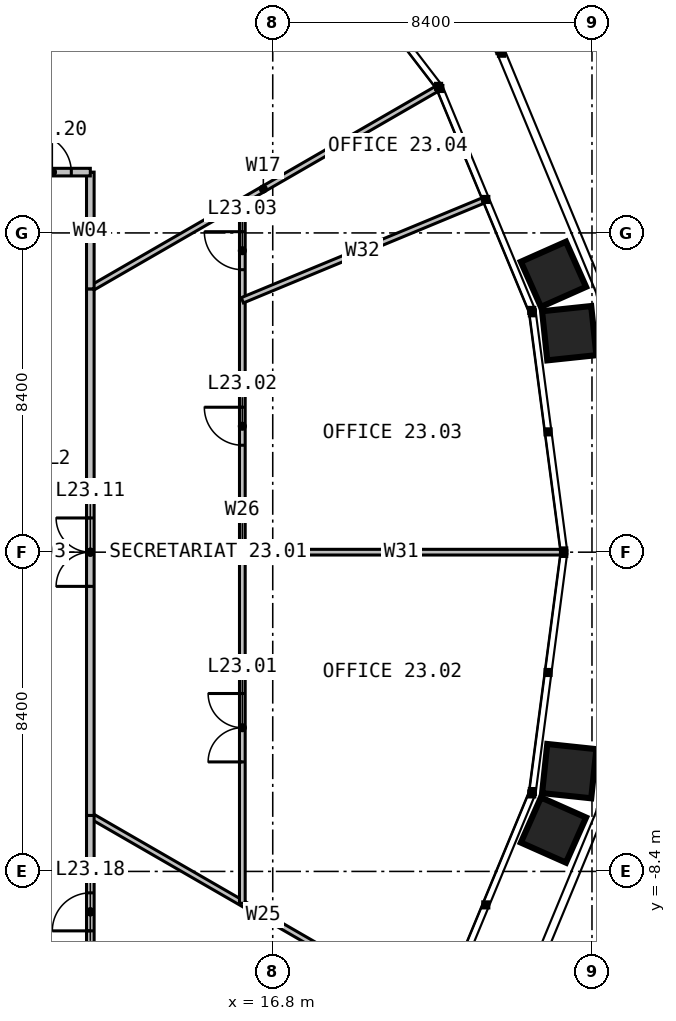
"""IFC4 building model, lengths in metres.
Left out: names, types, materials, properties, quantities, classifications, styles, units other than length and angle.
Written with IfcOpenShell. Run it as: python <this file> out.ifc"""

import sys

from ifc_helpers import new_model, si_unit, direction, frame, frame_2d, origin, place, context, subcontext, project, spatial, rectangle, extrude, element, fill, save


model = new_model("IFC4")
c1 = context("Model", 3, precision=1e-05, world=origin(), true_north=direction((0.0, 1.0)))
c2 = subcontext(c1, "Body", "Model", "MODEL_VIEW")
j1 = project(units=[si_unit("LENGTHUNIT", "METRE"), si_unit("PLANEANGLEUNIT", "RADIAN")], contexts=[c1])
p1 = place(None, origin())
s1 = spatial("IfcSite", under=j1, at=p1, CompositionType="ELEMENT")
p2 = place(p1, origin())
s2 = spatial("IfcBuilding", under=s1, at=p2, CompositionType="ELEMENT")
p3 = place(p2, frame((0.0, 0.0, 98.0)))
s3 = spatial("IfcBuildingStorey", under=s2, at=p3, CompositionType="ELEMENT", Elevation=98.0)
for number, where, z_axis, x_axis in (
    (1, (12.0, -6.928, 0.0), (0.0, 0.0, 1.0), (0.866, -0.5, 0.0)),
    (2, (12.0, 6.928, 0.0), (0.0, 0.0, 1.0), (0.866, 0.5, 0.0)),
):
    element("IfcWall", number, at=place(p3, frame(where, z_axis=z_axis, x_axis=x_axis)), inside=s3, PredefinedType="PARTITIONING", context=c2, shape_type="SweptSolid", body=[
        extrude(rectangle(XDim=10.514, YDim=0.15, at=frame_2d((5.257, 0.0))), origin(), (0.0, 0.0, 1.0), 2.79),
    ])
p4 = place(p3, frame((16.0, -9.238, 0.0), z_axis=(0.0, 0.0, 1.0), x_axis=(0.0, 1.0, 0.0)))
e3 = element("IfcWall", 3, at=p4, inside=s3, PredefinedType="PARTITIONING", context=c2, shape_type="SweptSolid", body=[
    extrude(rectangle(XDim=18.475, YDim=0.15, at=frame_2d((9.238, 0.0))), origin(), (0.0, 0.0, 1.0), 2.79),
])
p5 = place(p4, frame((3.719, 0.0, 0.0)))
e4 = element("IfcOpeningElement", 4, at=p5, cuts=e3, PredefinedType="OPENING", context=c2, shape_type="SweptSolid", body=[
    extrude(rectangle(XDim=1.8, YDim=2.2, at=frame_2d((0.9, 1.1))), frame((0.0, 0.085, 0.0), z_axis=(0.0, -1.0, 0.0), x_axis=(1.0, 0.0, 0.0)), (0.0, 0.0, 1.0), 0.17),
])
p6 = place(p4, frame((12.051, 0.0, 0.0)))
e5 = element("IfcOpeningElement", 5, at=p6, cuts=e3, PredefinedType="OPENING", context=c2, shape_type="SweptSolid", body=[
    extrude(rectangle(XDim=1.0, YDim=2.2, at=frame_2d((0.5, 1.1))), frame((0.0, 0.085, 0.0), z_axis=(0.0, -1.0, 0.0), x_axis=(1.0, 0.0, 0.0)), (0.0, 0.0, 1.0), 0.17),
])
p7 = place(p4, frame((16.67, 0.0, 0.0)))
e6 = element("IfcOpeningElement", 6, at=p7, cuts=e3, PredefinedType="OPENING", context=c2, shape_type="SweptSolid", body=[
    extrude(rectangle(XDim=1.0, YDim=2.2, at=frame_2d((0.5, 1.1))), frame((0.0, 0.085, 0.0), z_axis=(0.0, -1.0, 0.0), x_axis=(1.0, 0.0, 0.0)), (0.0, 0.0, 1.0), 0.17),
])
p8 = place(p3, frame((16.0, 0.0, 0.0), z_axis=(0.0, 0.0, 1.0), x_axis=(1.0, 0.0, 0.0)))
e7 = element("IfcWall", 7, at=p8, inside=s3, PredefinedType="PARTITIONING", context=c2, shape_type="SweptSolid", body=[
    extrude(rectangle(XDim=8.37, YDim=0.15, at=frame_2d((4.185, 0.0))), origin(), (0.0, 0.0, 1.0), 2.79),
])
p9 = place(p3, frame((16.0, 6.627, 0.0), z_axis=(0.0, 0.0, 1.0), x_axis=(0.923878127723, 0.382686823805, 0.0)))
e8 = element("IfcWall", 8, at=p9, inside=s3, PredefinedType="PARTITIONING", context=c2, shape_type="SweptSolid", body=[
    extrude(rectangle(XDim=6.844, YDim=0.15, at=frame_2d((3.422, 0.0))), origin(), (0.0, 0.0, 1.0), 2.79),
])
p10 = place(p3, frame((12.0, -6.928, 0.0), z_axis=(0.0, 0.0, 1.0), x_axis=(0.0, 1.0, 0.0)))
e9 = element("IfcWall", 9, at=p10, inside=s3, PredefinedType="PARTITIONING", context=c2, shape_type="SweptSolid", body=[
    extrude(rectangle(XDim=13.856, YDim=0.2, at=frame_2d((6.928, 0.0))), origin(), (0.0, 0.0, 1.0), 3.8),
])
p11 = place(p10, frame((6.028, 0.0, 0.0)))
e10 = element("IfcOpeningElement", 10, at=p11, cuts=e9, PredefinedType="OPENING", context=c2, shape_type="SweptSolid", body=[
    extrude(rectangle(XDim=1.8, YDim=2.2, at=frame_2d((0.9, 1.1))), frame((0.0, 0.11, 0.0), z_axis=(0.0, -1.0, 0.0), x_axis=(1.0, 0.0, 0.0)), (0.0, 0.0, 1.0), 0.22),
])
p12 = place(p3, frame((12.0, 6.928, 0.0), z_axis=(0.0, 0.0, 1.0), x_axis=(0.0, 1.0, 0.0)))
e11 = element("IfcWall", 11, at=p12, inside=s3, PredefinedType="PARTITIONING", context=c2, shape_type="SweptSolid", body=[
    extrude(rectangle(XDim=3.072, YDim=0.2, at=frame_2d((1.536, 0.0))), origin(), (0.0, 0.0, 1.0), 3.8),
])
p13 = place(p3, frame((12.0, -12.0, 0.0), z_axis=(0.0, 0.0, 1.0), x_axis=(0.0, 1.0, 0.0)))
e12 = element("IfcWall", 12, at=p13, inside=s3, PredefinedType="PARTITIONING", context=c2, shape_type="SweptSolid", body=[
    extrude(rectangle(XDim=5.072, YDim=0.2, at=frame_2d((2.536, 0.0))), origin(), (0.0, 0.0, 1.0), 3.8),
])
p14 = place(p13, frame((2.036, 0.0, 0.0)))
e13 = element("IfcOpeningElement", 13, at=p14, cuts=e12, PredefinedType="OPENING", context=c2, shape_type="SweptSolid", body=[
    extrude(rectangle(XDim=1.0, YDim=2.2, at=frame_2d((0.5, 1.1))), frame((0.0, 0.11, 0.0), z_axis=(0.0, -1.0, 0.0), x_axis=(1.0, 0.0, 0.0)), (0.0, 0.0, 1.0), 0.22),
])
p15 = place(p3, frame((10.0, 10.0, 0.0), z_axis=(0.0, 0.0, 1.0), x_axis=(1.0, 0.0, 0.0)))
e14 = element("IfcWall", 14, at=p15, inside=s3, PredefinedType="PARTITIONING", context=c2, shape_type="SweptSolid", body=[
    extrude(rectangle(XDim=2.0, YDim=0.2, at=frame_2d((1.0, 0.0))), origin(), (0.0, 0.0, 1.0), 3.8),
])
p16 = place(p15, frame((0.5, 0.0, 0.0)))
e15 = element("IfcOpeningElement", 15, at=p16, cuts=e14, PredefinedType="OPENING", context=c2, shape_type="SweptSolid", body=[
    extrude(rectangle(XDim=1.0, YDim=2.2, at=frame_2d((0.5, 1.1))), frame((0.0, 0.11, 0.0), z_axis=(0.0, -1.0, 0.0), x_axis=(1.0, 0.0, 0.0)), (0.0, 0.0, 1.0), 0.22),
])
p17 = place(p5, origin())
e16 = element("IfcDoor", 16, at=p17, inside=s3, OperationType="DOUBLE_DOOR_SINGLE_SWING", PredefinedType="DOOR", context=c2, shape_type="SweptSolid", body=[
    extrude(rectangle(XDim=1.8, YDim=2.2, at=frame_2d((0.9, 1.1))), frame((0.0, 0.025, 0.0), z_axis=(0.0, -1.0, 0.0), x_axis=(1.0, 0.0, 0.0)), (0.0, 0.0, 1.0), 0.05),
])
fill(e4, e16)
p18 = place(p6, origin())
e17 = element("IfcDoor", 17, at=p18, inside=s3, OperationType="SINGLE_SWING_RIGHT", PredefinedType="DOOR", context=c2, shape_type="SweptSolid", body=[
    extrude(rectangle(XDim=1.0, YDim=2.2, at=frame_2d((0.5, 1.1))), frame((0.0, 0.025, 0.0), z_axis=(0.0, -1.0, 0.0), x_axis=(1.0, 0.0, 0.0)), (0.0, 0.0, 1.0), 0.05),
])
fill(e5, e17)
p19 = place(p7, origin())
e18 = element("IfcDoor", 18, at=p19, inside=s3, OperationType="SINGLE_SWING_RIGHT", PredefinedType="DOOR", context=c2, shape_type="SweptSolid", body=[
    extrude(rectangle(XDim=1.0, YDim=2.2, at=frame_2d((0.5, 1.1))), frame((0.0, 0.025, 0.0), z_axis=(0.0, -1.0, 0.0), x_axis=(1.0, 0.0, 0.0)), (0.0, 0.0, 1.0), 0.05),
])
fill(e6, e18)
p20 = place(p11, origin())
e19 = element("IfcDoor", 19, at=p20, inside=s3, OperationType="DOUBLE_DOOR_SINGLE_SWING", PredefinedType="DOOR", context=c2, shape_type="SweptSolid", body=[
    extrude(rectangle(XDim=1.8, YDim=2.2, at=frame_2d((0.9, 1.1))), frame((0.0, 0.025, 0.0), z_axis=(0.0, -1.0, 0.0), x_axis=(1.0, 0.0, 0.0)), (0.0, 0.0, 1.0), 0.05),
])
fill(e10, e19)
p21 = place(p14, origin())
e20 = element("IfcDoor", 20, at=p21, inside=s3, OperationType="SINGLE_SWING_LEFT", PredefinedType="DOOR", context=c2, shape_type="SweptSolid", body=[
    extrude(rectangle(XDim=1.0, YDim=2.2, at=frame_2d((0.5, 1.1))), frame((0.0, 0.025, 0.0), z_axis=(0.0, -1.0, 0.0), x_axis=(1.0, 0.0, 0.0)), (0.0, 0.0, 1.0), 0.05),
])
fill(e13, e20)
p22 = place(p16, origin())
e21 = element("IfcDoor", 21, at=p22, inside=s3, OperationType="SINGLE_SWING_LEFT", PredefinedType="DOOR", context=c2, shape_type="SweptSolid", body=[
    extrude(rectangle(XDim=1.0, YDim=2.2, at=frame_2d((0.5, 1.1))), frame((0.0, 0.025, 0.0), z_axis=(0.0, -1.0, 0.0), x_axis=(1.0, 0.0, 0.0)), (0.0, 0.0, 1.0), 0.05),
])
fill(e15, e21)
save(model, sys.argv[1])
